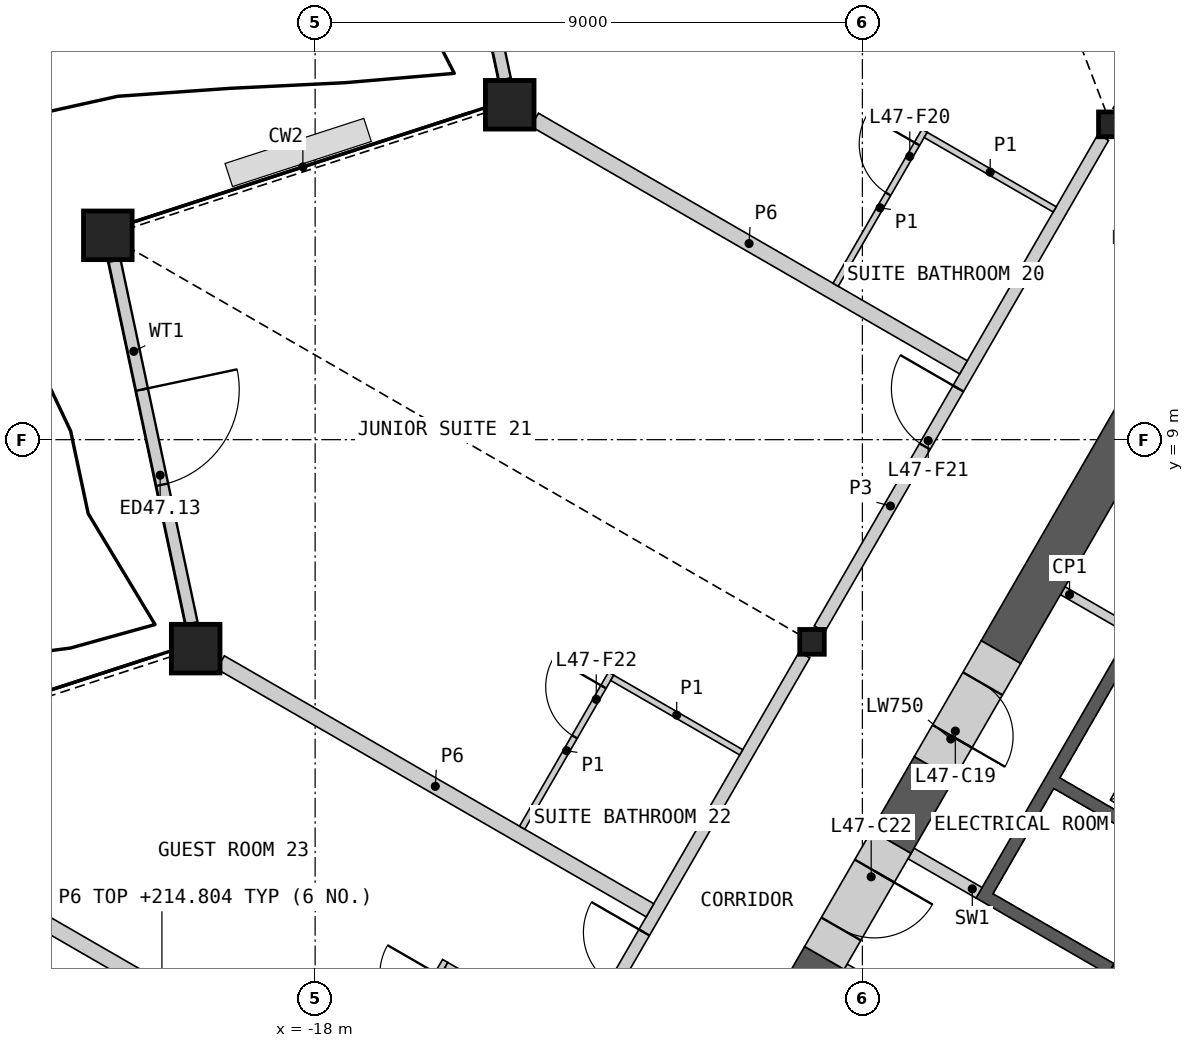
"""IFC4 building model, lengths in metres.
Left out: names, types, materials, properties, quantities, classifications, styles, units other than length and angle.
Written with IfcOpenShell. Run it as: python <this file> out.ifc"""

import sys

from ifc_helpers import new_model, si_unit, direction, frame, frame_2d, origin, origin_2d, place, context, subcontext, project, spatial, polyline, rectangle, hollow_rectangle, i_section, outline, extrude, element, fill, save


model = new_model("IFC4")
c1 = context("Model", 3, precision=1e-05, world=origin(), true_north=direction((0.0, 1.0)))
c2 = subcontext(c1, "Body", "Model", "MODEL_VIEW")
j1 = project(units=[si_unit("LENGTHUNIT", "METRE"), si_unit("PLANEANGLEUNIT", "RADIAN")], contexts=[c1])
p1 = place(None, origin())
s1 = spatial("IfcSite", under=j1, at=p1, CompositionType="ELEMENT")
p2 = place(p1, origin())
s2 = spatial("IfcBuilding", under=s1, at=p2, CompositionType="ELEMENT")
p3 = place(p2, frame((0.0, 0.0, 212.4)))
s3 = spatial("IfcBuildingStorey", under=s2, at=p3, CompositionType="ELEMENT", Elevation=212.4)
for number, where, z_axis, x_axis in (
    (1, (-14.8, 14.508, 0.0), (0.0, 0.0, 1.0), (1.0, 0.0, 0.0)),
    (2, (-21.409, 12.361, 0.0), (0.0, 0.0, 1.0), (1.0, 0.0, 0.0)),
    (3, (-19.965, 5.563, 0.0), (0.0, 0.0, 1.0), (1.0, 0.0, 0.0)),
):
    element("IfcColumn", number, at=place(p3, frame(where, z_axis=z_axis, x_axis=x_axis)), inside=s3, PredefinedType="COLUMN", context=c2, shape_type="SweptSolid", body=[
        extrude(hollow_rectangle(XDim=0.8, YDim=0.8, WallThickness=0.05, at=origin_2d()), origin(), (0.0, 0.0, 1.0), 3.6),
    ])
for number, where, z_axis, x_axis in (
    (4, (-4.914, 14.186, 0.0), (0.0, 0.0, 1.0), (1.0, 0.0, 0.0)),
    (5, (-9.828, 5.675, 0.0), (0.0, 0.0, 1.0), (1.0, 0.0, 0.0)),
):
    element("IfcColumn", number, at=place(p3, frame(where, z_axis=z_axis, x_axis=x_axis)), inside=s3, PredefinedType="COLUMN", context=c2, shape_type="SweptSolid", body=[
        extrude(i_section(OverallWidth=0.404, OverallDepth=0.407, WebThickness=0.027, FlangeThickness=0.044, at=origin_2d()), origin(), (0.0, 0.0, 1.0), 3.6),
    ])
p4 = place(p3, frame((-16.146, 20.89, 0.0), z_axis=(0.0, 0.0, 1.0), x_axis=(0.207912864597, -0.978147351238, 0.0)))
e6 = element("IfcWall", 6, at=p4, inside=s3, PredefinedType="SOLIDWALL", context=c2, shape_type="SweptSolid", body=[
    extrude(rectangle(XDim=6.098, YDim=0.2, at=frame_2d((3.049, 0.0))), origin(), (0.0, 0.0, 1.0), 2.701),
])
p5 = place(p4, frame((2.184, 0.0, 0.0)))
e7 = element("IfcOpeningElement", 7, at=p5, cuts=e6, PredefinedType="OPENING", context=c2, shape_type="SweptSolid", body=[
    extrude(rectangle(XDim=1.6, YDim=2.4, at=frame_2d((0.8, 1.2))), frame((0.0, 0.11, 0.0), z_axis=(0.0, -1.0, 0.0), x_axis=(1.0, 0.0, 0.0)), (0.0, 0.0, 1.0), 0.22),
])
p6 = place(p3, frame((-21.299, 11.944, 0.0), z_axis=(0.0, 0.0, 1.0), x_axis=(0.207912864597, -0.978147351238, 0.0)))
e8 = element("IfcWall", 8, at=p6, inside=s3, PredefinedType="SOLIDWALL", context=c2, shape_type="SweptSolid", body=[
    extrude(rectangle(XDim=6.098, YDim=0.2, at=frame_2d((3.049, 0.0))), origin(), (0.0, 0.0, 1.0), 2.701),
])
p7 = place(p6, frame((2.168, 0.0, 0.0)))
e9 = element("IfcOpeningElement", 9, at=p7, cuts=e8, PredefinedType="OPENING", context=c2, shape_type="SweptSolid", body=[
    extrude(rectangle(XDim=1.6, YDim=2.4, at=frame_2d((0.8, 1.2))), frame((0.0, 0.11, 0.0), z_axis=(0.0, -1.0, 0.0), x_axis=(1.0, 0.0, 0.0)), (0.0, 0.0, 1.0), 0.22),
])
p8 = place(p3, origin())
e10 = element("IfcWall", 10, at=p8, inside=s3, PredefinedType="SHEAR", context=c2, shape_type="SweptSolid", body=[
    extrude(outline(polyline([(-4.96, 0.208), (-7.131, 1.461), (-3.731, 7.35), (-1.561, 6.097), (-1.66, 5.924), (-3.652, 7.074), (-4.652, 5.342), (-2.66, 4.192), (-2.76, 4.019), (-4.752, 5.169), (-5.752, 3.437), (-3.76, 2.287), (-3.861, 2.113), (-5.852, 3.263), (-6.852, 1.531), (-4.861, 0.381), (-4.96, 0.208)])), origin(), (0.0, 0.0, 1.0), 3.25),
])
p9 = place(p3, frame((-1.631, 5.776, 0.0), z_axis=(0.0, 0.0, 1.0), x_axis=(-0.499992876559, -0.866029516466, 0.0)))
e11 = element("IfcWall", 11, at=p9, inside=s3, PredefinedType="SOLIDWALL", context=c2, shape_type="SweptSolid", body=[
    extrude(rectangle(XDim=6.486, YDim=0.2, at=frame_2d((3.243, 0.0))), origin(), (0.0, 0.0, 1.0), 3.25),
])
p10 = place(p9, frame((0.337, 0.0, 0.0)))
e12 = element("IfcOpeningElement", 12, at=p10, cuts=e11, PredefinedType="OPENING", context=c2, shape_type="SweptSolid", body=[
    extrude(rectangle(XDim=1.1, YDim=2.1, at=frame_2d((0.55, 1.05))), frame((0.0, 0.11, 0.0), z_axis=(0.0, -1.0, 0.0), x_axis=(1.0, 0.0, 0.0)), (0.0, 0.0, 1.0), 0.22),
])
p11 = place(p9, frame((2.537, 0.0, 0.0)))
e13 = element("IfcOpeningElement", 13, at=p11, cuts=e11, PredefinedType="OPENING", context=c2, shape_type="SweptSolid", body=[
    extrude(rectangle(XDim=1.1, YDim=2.1, at=frame_2d((0.55, 1.05))), frame((0.0, 0.11, 0.0), z_axis=(0.0, -1.0, 0.0), x_axis=(1.0, 0.0, 0.0)), (0.0, 0.0, 1.0), 0.22),
])
for number, where, z_axis, x_axis in (
    (14, (-7.081, 1.548, 0.0), (0.0, 0.0, 1.0), (-0.866, 0.5, 0.0)),
    (15, (-8.181, -0.357, 0.0), (0.0, 0.0, 1.0), (-0.866, 0.5, 0.0)),
):
    element("IfcWall", number, at=place(p3, frame(where, z_axis=z_axis, x_axis=x_axis)), inside=s3, PredefinedType="SHEAR", context=c2, shape_type="SweptSolid", body=[
        extrude(rectangle(XDim=1.293, YDim=0.2, at=frame_2d((0.646, 0.0))), origin(), (0.0, 0.0, 1.0), 3.25),
    ])
p12 = place(p3, frame((-5.705, 6.516, 0.0), z_axis=(0.0, 0.0, 1.0), x_axis=(0.866003189247, -0.500038474733, 0.0)))
e16 = element("IfcWall", 16, at=p12, inside=s3, PredefinedType="PARTITIONING", context=c2, shape_type="SweptSolid", body=[
    extrude(rectangle(XDim=1.293, YDim=0.15, at=frame_2d((0.646, 0.0))), origin(), (0.0, 0.0, 1.0), 3.25),
])
p13 = place(p3, frame((-9.625, 0.477, 0.0), z_axis=(0.0, 0.0, 1.0), x_axis=(-0.499986234705, -0.866033351035, 0.0)))
e17 = element("IfcWall", 17, at=p13, inside=s3, PredefinedType="SHEAR", context=c2, shape_type="SweptSolid", body=[
    extrude(rectangle(XDim=9.801, YDim=0.75, at=frame_2d((4.9, 0.0))), origin(), (0.0, 0.0, 1.0), 3.25),
])
p14 = place(p3, frame((-3.708, 10.724, 0.0), z_axis=(0.0, 0.0, 1.0), x_axis=(-0.500021737671, -0.866012853171, 0.0)))
e18 = element("IfcWall", 18, at=p14, inside=s3, PredefinedType="SHEAR", context=c2, shape_type="SweptSolid", body=[
    extrude(rectangle(XDim=6.026, YDim=0.75, at=frame_2d((3.013, 0.0))), origin(), (0.0, 0.0, 1.0), 3.25),
])
p15 = place(p3, frame((-7.821, 3.601, 0.0), z_axis=(0.0, 0.0, 1.0), x_axis=(-0.49996263964, -0.866046972724, 0.0)))
e19 = element("IfcWall", 19, at=p15, inside=s3, PredefinedType="SHEAR", context=c2, shape_type="SweptSolid", body=[
    extrude(rectangle(XDim=1.408, YDim=0.75, at=frame_2d((0.704, 0.0))), origin(), (0.0, 0.0, 1.0), 3.25),
])
p16 = place(p3, frame((-6.721, 5.506, 0.0), z_axis=(0.0, 0.0, 1.0), x_axis=(-0.499946605688, -0.86605622881, 0.0)))
e20 = element("IfcWall", 20, at=p16, inside=s3, PredefinedType="SHEAR", context=c2, shape_type="SweptSolid", body=[
    extrude(rectangle(XDim=2.2, YDim=0.75, at=frame_2d((1.1, 0.0))), origin(), (0.0, 0.0, 1.0), 3.25),
])
p17 = place(p16, frame((0.6, 0.0, 0.0)))
e21 = element("IfcOpeningElement", 21, at=p17, cuts=e20, PredefinedType="OPENING", context=c2, shape_type="SweptSolid", body=[
    extrude(rectangle(XDim=1.0, YDim=2.1, at=frame_2d((0.5, 1.05))), frame((0.0, 0.385, 0.0), z_axis=(0.0, -1.0, 0.0), x_axis=(1.0, 0.0, 0.0)), (0.0, 0.0, 1.0), 0.77),
])
p18 = place(p3, frame((-8.525, 2.382, 0.0), z_axis=(0.0, 0.0, 1.0), x_axis=(-0.500077893725, -0.86598042715, 0.0)))
e22 = element("IfcWall", 22, at=p18, inside=s3, PredefinedType="SHEAR", context=c2, shape_type="SweptSolid", body=[
    extrude(rectangle(XDim=2.2, YDim=0.75, at=frame_2d((1.1, 0.0))), origin(), (0.0, 0.0, 1.0), 3.25),
])
p19 = place(p18, frame((0.55, 0.0, 0.0)))
e23 = element("IfcOpeningElement", 23, at=p19, cuts=e22, PredefinedType="OPENING", context=c2, shape_type="SweptSolid", body=[
    extrude(rectangle(XDim=1.1, YDim=2.1, at=frame_2d((0.55, 1.05))), frame((0.0, 0.385, 0.0), z_axis=(0.0, -1.0, 0.0), x_axis=(1.0, 0.0, 0.0)), (0.0, 0.0, 1.0), 0.77),
])
p20 = place(p3, frame((-26.164, 3.199, 0.0), z_axis=(0.0, 0.0, 1.0), x_axis=(0.866029635251, -0.499992670813, 0.0)))
e24 = element("IfcWall", 24, at=p20, inside=s3, PredefinedType="PARTITIONING", context=c2, shape_type="SweptSolid", body=[
    extrude(rectangle(XDim=13.035, YDim=0.25, at=frame_2d((6.518, 0.0))), origin(), (0.0, 0.0, 1.0), 2.404),
])
p21 = place(p3, frame((-9.705, 5.888, 0.0), z_axis=(0.0, 0.0, 1.0), x_axis=(0.50000393355, 0.866023132736, 0.0)))
e25 = element("IfcWall", 25, at=p21, inside=s3, PredefinedType="PARTITIONING", context=c2, shape_type="SweptSolid", body=[
    extrude(rectangle(XDim=9.335, YDim=0.2, at=frame_2d((4.667, 0.0))), origin(), (0.0, 0.0, 1.0), 3.25),
])
p22 = place(p21, frame((3.465, 0.0, 0.0)))
e26 = element("IfcOpeningElement", 26, at=p22, cuts=e25, PredefinedType="OPENING", context=c2, shape_type="SweptSolid", body=[
    extrude(rectangle(XDim=1.1, YDim=2.1, at=frame_2d((0.55, 1.05))), frame((0.0, 0.11, 0.0), z_axis=(0.0, -1.0, 0.0), x_axis=(1.0, 0.0, 0.0)), (0.0, 0.0, 1.0), 0.22),
])
p23 = place(p3, frame((-14.619, -2.624, 0.0), z_axis=(0.0, 0.0, 1.0), x_axis=(0.50000393355, 0.866023132736, 0.0)))
e27 = element("IfcWall", 27, at=p23, inside=s3, PredefinedType="PARTITIONING", context=c2, shape_type="SweptSolid", body=[
    extrude(rectangle(XDim=9.335, YDim=0.2, at=frame_2d((4.667, 0.0))), origin(), (0.0, 0.0, 1.0), 3.25),
])
p24 = place(p23, frame((3.062, 0.0, 0.0)))
e28 = element("IfcOpeningElement", 28, at=p24, cuts=e27, PredefinedType="OPENING", context=c2, shape_type="SweptSolid", body=[
    extrude(rectangle(XDim=1.0, YDim=2.1, at=frame_2d((0.5, 1.05))), frame((0.0, 0.11, 0.0), z_axis=(0.0, -1.0, 0.0), x_axis=(1.0, 0.0, 0.0)), (0.0, 0.0, 1.0), 0.22),
])
p25 = place(p3, frame((-19.555, 5.337, 0.0), z_axis=(0.0, 0.0, 1.0), x_axis=(0.866023543838, -0.500003221507, 0.0)))
e29 = element("IfcWall", 29, at=p25, inside=s3, PredefinedType="PARTITIONING", context=c2, shape_type="SweptSolid", body=[
    extrude(rectangle(XDim=8.154, YDim=0.25, at=frame_2d((4.077, 0.0))), origin(), (0.0, 0.0, 1.0), 2.404),
])
p26 = place(p3, frame((-14.39, 14.261, 0.0), z_axis=(0.0, 0.0, 1.0), x_axis=(0.86603182394, -0.4999888798, 0.0)))
e30 = element("IfcWall", 30, at=p26, inside=s3, PredefinedType="PARTITIONING", context=c2, shape_type="SweptSolid", body=[
    extrude(rectangle(XDim=8.144, YDim=0.25, at=frame_2d((4.072, 0.0))), origin(), (0.0, 0.0, 1.0), 2.404),
])
p27 = place(p3, frame((-4.791, 14.4, 0.0), z_axis=(0.0, 0.0, 1.0), x_axis=(0.50000762079, 0.866021003874, 0.0)))
e31 = element("IfcWall", 31, at=p27, inside=s3, PredefinedType="PARTITIONING", context=c2, shape_type="SweptSolid", body=[
    extrude(rectangle(XDim=5.756, YDim=0.2, at=frame_2d((2.878, 0.0))), origin(), (0.0, 0.0, 1.0), 3.25),
])
p28 = place(p27, frame((4.304, 0.0, 0.0)))
e32 = element("IfcOpeningElement", 32, at=p28, cuts=e31, PredefinedType="OPENING", context=c2, shape_type="SweptSolid", body=[
    extrude(rectangle(XDim=1.1, YDim=2.1, at=frame_2d((0.55, 1.05))), frame((0.0, 0.11, 0.0), z_axis=(0.0, -1.0, 0.0), x_axis=(1.0, 0.0, 0.0)), (0.0, 0.0, 1.0), 0.22),
])
p29 = place(p3, frame((-18.461, -4.077, 0.0), z_axis=(0.0, 0.0, 1.0), x_axis=(0.499971721724, 0.866041729639, 0.0)))
e33 = element("IfcWall", 33, at=p29, inside=s3, PredefinedType="PARTITIONING", context=c2, shape_type="SweptSolid", body=[
    extrude(rectangle(XDim=5.2, YDim=0.1, at=frame_2d((2.6, 0.0))), origin(), (0.0, 0.0, 1.0), 2.404),
])
p30 = place(p29, frame((4.0, 0.0, 0.0)))
e34 = element("IfcOpeningElement", 34, at=p30, cuts=e33, PredefinedType="OPENING", context=c2, shape_type="SweptSolid", body=[
    extrude(rectangle(XDim=0.95, YDim=2.1, at=frame_2d((0.475, 1.05))), frame((0.0, 0.06, 0.0), z_axis=(0.0, -1.0, 0.0), x_axis=(1.0, 0.0, 0.0)), (0.0, 0.0, 1.0), 0.12),
])
p31 = place(p29, frame((0.25, 0.0, 0.0)))
e35 = element("IfcOpeningElement", 35, at=p31, cuts=e33, PredefinedType="OPENING", context=c2, shape_type="SweptSolid", body=[
    extrude(rectangle(XDim=0.95, YDim=2.1, at=frame_2d((0.475, 1.05))), frame((0.0, 0.06, 0.0), z_axis=(0.0, -1.0, 0.0), x_axis=(1.0, 0.0, 0.0)), (0.0, 0.0, 1.0), 0.12),
])
p32 = place(p3, frame((-14.595, 2.618, 0.0), z_axis=(0.0, 0.0, 1.0), x_axis=(0.500062034277, 0.865989585315, 0.0)))
e36 = element("IfcWall", 36, at=p32, inside=s3, PredefinedType="PARTITIONING", context=c2, shape_type="SweptSolid", body=[
    extrude(rectangle(XDim=2.925, YDim=0.1, at=frame_2d((1.462, 0.0))), origin(), (0.0, 0.0, 1.0), 2.404),
])
p33 = place(p32, frame((1.725, 0.0, 0.0)))
e37 = element("IfcOpeningElement", 37, at=p33, cuts=e36, PredefinedType="OPENING", context=c2, shape_type="SweptSolid", body=[
    extrude(rectangle(XDim=0.95, YDim=2.1, at=frame_2d((0.475, 1.05))), frame((0.0, 0.06, 0.0), z_axis=(0.0, -1.0, 0.0), x_axis=(1.0, 0.0, 0.0)), (0.0, 0.0, 1.0), 0.12),
])
p34 = place(p3, frame((-9.44, 11.548, 0.0), z_axis=(0.0, 0.0, 1.0), x_axis=(0.499963291492, 0.866046596414, 0.0)))
e38 = element("IfcWall", 38, at=p34, inside=s3, PredefinedType="PARTITIONING", context=c2, shape_type="SweptSolid", body=[
    extrude(rectangle(XDim=2.925, YDim=0.1, at=frame_2d((1.462, 0.0))), origin(), (0.0, 0.0, 1.0), 2.404),
])
p35 = place(p34, frame((1.725, 0.0, 0.0)))
e39 = element("IfcOpeningElement", 39, at=p35, cuts=e38, PredefinedType="OPENING", context=c2, shape_type="SweptSolid", body=[
    extrude(rectangle(XDim=0.95, YDim=2.1, at=frame_2d((0.475, 1.05))), frame((0.0, 0.06, 0.0), z_axis=(0.0, -1.0, 0.0), x_axis=(1.0, 0.0, 0.0)), (0.0, 0.0, 1.0), 0.12),
])
p36 = place(p3, frame((-15.843, 0.358, 0.0), z_axis=(0.0, 0.0, 1.0), x_axis=(0.866014668023, -0.500018594424, 0.0)))
e40 = element("IfcWall", 40, at=p36, inside=s3, PredefinedType="PARTITIONING", context=c2, shape_type="SweptSolid", body=[
    extrude(rectangle(XDim=2.45, YDim=0.1, at=frame_2d((1.225, 0.0))), origin(), (0.0, 0.0, 1.0), 2.404),
])
p37 = place(p3, frame((-13.115, 5.083, 0.0), z_axis=(0.0, 0.0, 1.0), x_axis=(0.866032905446, -0.499987006516, 0.0)))
e41 = element("IfcWall", 41, at=p37, inside=s3, PredefinedType="PARTITIONING", context=c2, shape_type="SweptSolid", body=[
    extrude(rectangle(XDim=2.45, YDim=0.1, at=frame_2d((1.225, 0.0))), origin(), (0.0, 0.0, 1.0), 2.404),
])
p38 = place(p3, frame((-7.959, 14.012, 0.0), z_axis=(0.0, 0.0, 1.0), x_axis=(0.866057815567, -0.499943856944, 0.0)))
e42 = element("IfcWall", 42, at=p38, inside=s3, PredefinedType="PARTITIONING", context=c2, shape_type="SweptSolid", body=[
    extrude(rectangle(XDim=2.45, YDim=0.1, at=frame_2d((1.225, 0.0))), origin(), (0.0, 0.0, 1.0), 2.404),
])
p39 = place(p7, origin())
e43 = element("IfcDoor", 43, at=p39, inside=s3, OperationType="DOUBLE_DOOR_SINGLE_SWING", PredefinedType="DOOR", context=c2, shape_type="SweptSolid", body=[
    extrude(rectangle(XDim=1.6, YDim=2.4, at=frame_2d((0.8, 1.2))), frame((0.0, 0.025, 0.0), z_axis=(0.0, -1.0, 0.0), x_axis=(1.0, 0.0, 0.0)), (0.0, 0.0, 1.0), 0.05),
])
fill(e9, e43)
p40 = place(p17, origin())
e44 = element("IfcDoor", 44, at=p40, inside=s3, OperationType="SINGLE_SWING_RIGHT", PredefinedType="DOOR", context=c2, shape_type="SweptSolid", body=[
    extrude(rectangle(XDim=1.0, YDim=2.1, at=frame_2d((0.5, 1.05))), frame((0.0, 0.13, 0.0), z_axis=(0.0, -1.0, 0.0), x_axis=(1.0, 0.0, 0.0)), (0.0, 0.0, 1.0), 0.05),
])
fill(e21, e44)
p41 = place(p19, origin())
e45 = element("IfcDoor", 45, at=p41, inside=s3, OperationType="SINGLE_SWING_LEFT", PredefinedType="DOOR", context=c2, shape_type="SweptSolid", body=[
    extrude(rectangle(XDim=1.1, YDim=2.1, at=frame_2d((0.55, 1.05))), frame((0.0, 0.13, 0.0), z_axis=(0.0, -1.0, 0.0), x_axis=(1.0, 0.0, 0.0)), (0.0, 0.0, 1.0), 0.05),
])
fill(e23, e45)
p42 = place(p35, origin())
e46 = element("IfcDoor", 46, at=p42, inside=s3, OperationType="SINGLE_SWING_RIGHT", PredefinedType="DOOR", context=c2, shape_type="SweptSolid", body=[
    extrude(rectangle(XDim=0.95, YDim=2.1, at=frame_2d((0.475, 1.05))), frame((0.0, 0.025, 0.0), z_axis=(0.0, -1.0, 0.0), x_axis=(1.0, 0.0, 0.0)), (0.0, 0.0, 1.0), 0.05),
])
fill(e39, e46)
p43 = place(p22, origin())
e47 = element("IfcDoor", 47, at=p43, inside=s3, OperationType="SINGLE_SWING_RIGHT", PredefinedType="DOOR", context=c2, shape_type="SweptSolid", body=[
    extrude(rectangle(XDim=1.1, YDim=2.1, at=frame_2d((0.55, 1.05))), frame((0.0, 0.025, 0.0), z_axis=(0.0, -1.0, 0.0), x_axis=(1.0, 0.0, 0.0)), (0.0, 0.0, 1.0), 0.05),
])
fill(e26, e47)
p44 = place(p33, origin())
e48 = element("IfcDoor", 48, at=p44, inside=s3, OperationType="SINGLE_SWING_RIGHT", PredefinedType="DOOR", context=c2, shape_type="SweptSolid", body=[
    extrude(rectangle(XDim=0.95, YDim=2.1, at=frame_2d((0.475, 1.05))), frame((0.0, 0.025, 0.0), z_axis=(0.0, -1.0, 0.0), x_axis=(1.0, 0.0, 0.0)), (0.0, 0.0, 1.0), 0.05),
])
fill(e37, e48)
p45 = place(p24, origin())
e49 = element("IfcDoor", 49, at=p45, inside=s3, OperationType="SINGLE_SWING_RIGHT", PredefinedType="DOOR", context=c2, shape_type="SweptSolid", body=[
    extrude(rectangle(XDim=1.0, YDim=2.1, at=frame_2d((0.5, 1.05))), frame((0.0, 0.025, 0.0), z_axis=(0.0, -1.0, 0.0), x_axis=(1.0, 0.0, 0.0)), (0.0, 0.0, 1.0), 0.05),
])
fill(e28, e49)
save(model, sys.argv[1])
